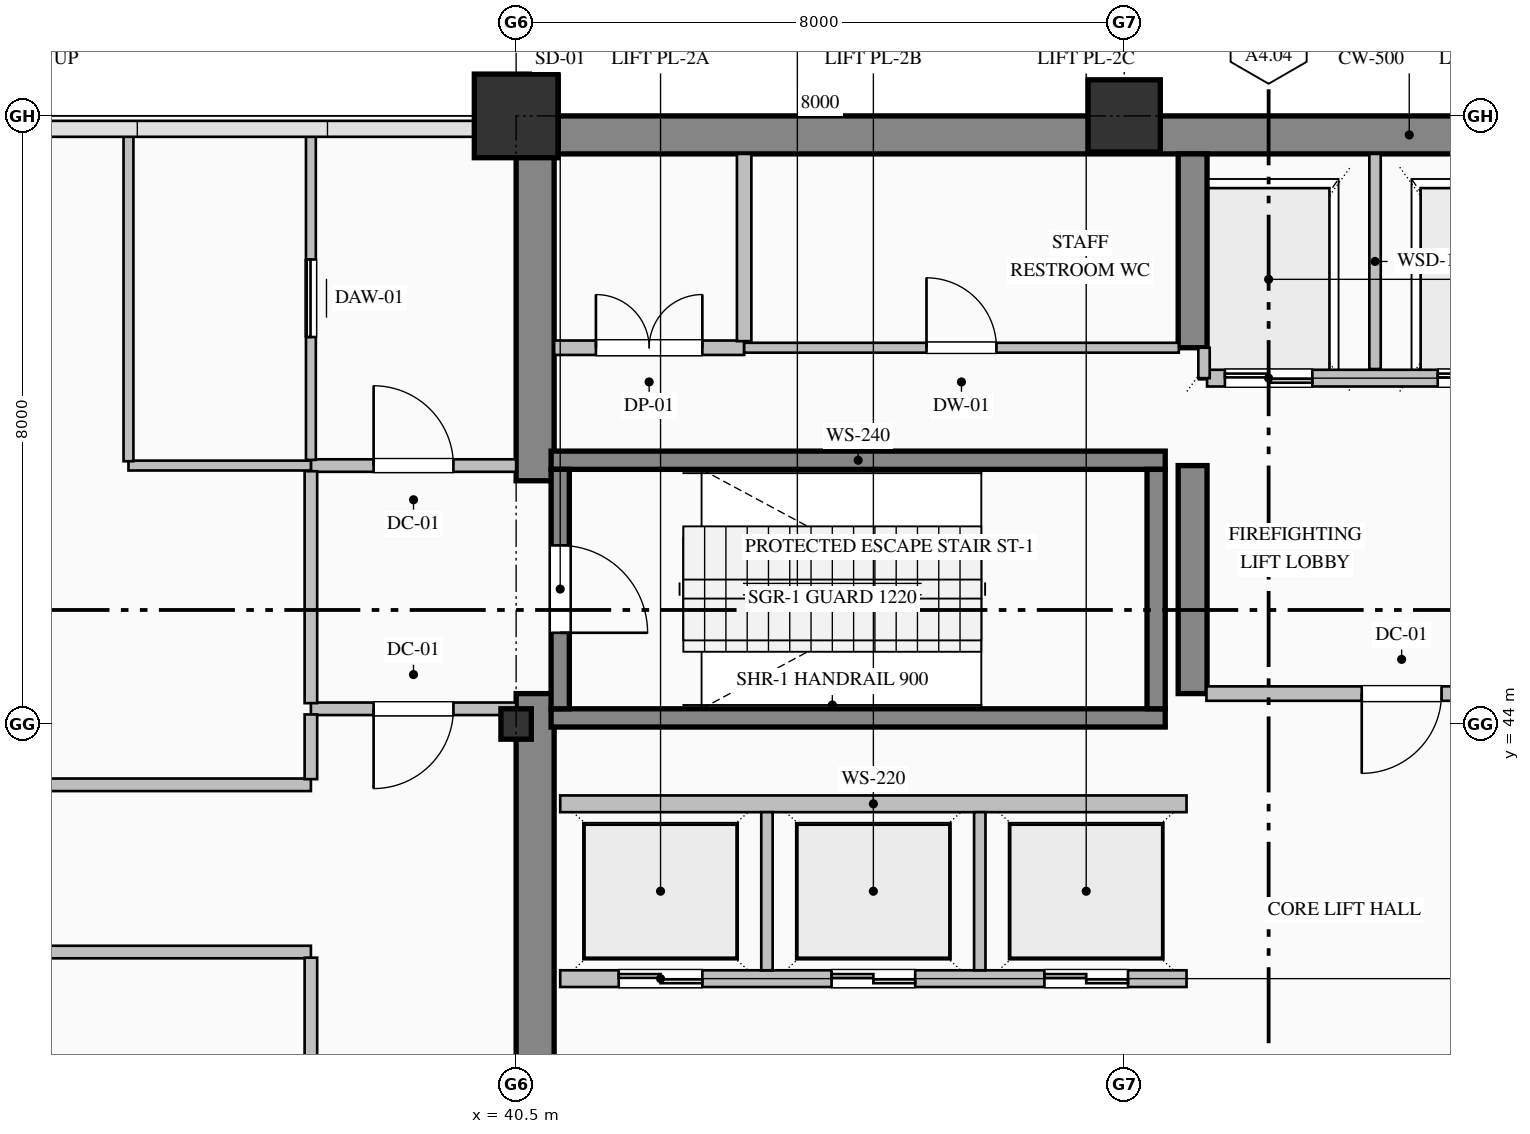
"""IFC4 building model, lengths in metres.
Left out: names, types, materials, properties, quantities, classifications, styles, units other than length and angle.
Written with IfcOpenShell. Run it as: python <this file> out.ifc"""

import sys

from ifc_helpers import new_model, si_unit, direction, frame, frame_2d, origin, origin_2d, place, context, subcontext, project, spatial, rectangle, hollow_rectangle, i_section, extrude, element, fill, save


model = new_model("IFC4")
c1 = context("Model", 3, precision=1e-05, world=origin(), true_north=direction((0.0, 1.0)))
c2 = subcontext(c1, "Body", "Model", "MODEL_VIEW")
j1 = project(units=[si_unit("LENGTHUNIT", "METRE"), si_unit("PLANEANGLEUNIT", "RADIAN")], contexts=[c1])
p1 = place(None, origin())
s1 = spatial("IfcSite", under=j1, at=p1, CompositionType="ELEMENT")
p2 = place(p1, origin())
s2 = spatial("IfcBuilding", under=s1, at=p2, CompositionType="ELEMENT")
p3 = place(p2, frame((0.0, 0.0, 113.6)))
s3 = spatial("IfcBuildingStorey", under=s2, at=p3, CompositionType="ELEMENT", Elevation=113.6)
p4 = place(p3, frame((40.5, 51.75, 0.0), z_axis=(0.0, 0.0, 1.0), x_axis=(1.0, 0.0, 0.0)))
e1 = element("IfcWall", 1, at=p4, inside=s3, PredefinedType="SHEAR", context=c2, shape_type="SweptSolid", body=[
    extrude(rectangle(XDim=23.5, YDim=0.5, at=frame_2d((11.75, 0.0))), origin(), (0.0, 0.0, 1.0), 5.165),
])
p5 = place(p3, frame((40.75, 36.5, 0.0), z_axis=(0.0, 0.0, 1.0), x_axis=(0.0, 1.0, 0.0)))
e2 = element("IfcWall", 2, at=p5, inside=s3, PredefinedType="SHEAR", context=c2, shape_type="SweptSolid", body=[
    extrude(rectangle(XDim=7.9, YDim=0.5, at=frame_2d((3.95, 0.0))), origin(), (0.0, 0.0, 1.0), 5.165),
])
p6 = place(p3, frame((40.75, 47.2, 0.0), z_axis=(0.0, 0.0, 1.0), x_axis=(0.0, 1.0, 0.0)))
e3 = element("IfcWall", 3, at=p6, inside=s3, PredefinedType="SHEAR", context=c2, shape_type="SweptSolid", body=[
    extrude(rectangle(XDim=4.3, YDim=0.5, at=frame_2d((2.15, 0.0))), origin(), (0.0, 0.0, 1.0), 5.165),
])
p7 = place(p3, frame((49.4, 44.4, 0.0), z_axis=(0.0, 0.0, 1.0), x_axis=(0.0, 1.0, 0.0)))
e4 = element("IfcWall", 4, at=p7, inside=s3, PredefinedType="SHEAR", context=c2, shape_type="SweptSolid", body=[
    extrude(rectangle(XDim=3.0, YDim=0.38, at=frame_2d((1.5, 0.0))), origin(), (0.0, 0.0, 1.0), 5.165),
])
p8 = place(p3, frame((49.4, 48.95, 0.0), z_axis=(0.0, 0.0, 1.0), x_axis=(0.0, 1.0, 0.0)))
e5 = element("IfcWall", 5, at=p8, inside=s3, PredefinedType="SHEAR", context=c2, shape_type="SweptSolid", body=[
    extrude(rectangle(XDim=2.55, YDim=0.38, at=frame_2d((1.275, 0.0))), origin(), (0.0, 0.0, 1.0), 5.165),
])
p9 = place(p3, frame((40.5, 44.0, 0.0), z_axis=(0.0, 0.0, 1.0), x_axis=(1.0, 0.0, 0.0)))
e6 = element("IfcColumn", 6, at=p9, inside=s3, PredefinedType="COLUMN", context=c2, shape_type="SweptSolid", body=[
    extrude(i_section(OverallWidth=0.4, OverallDepth=0.4, WebThickness=0.013, FlangeThickness=0.021, FilletRadius=0.022, at=origin_2d()), origin(), (0.0, 0.0, 1.0), 5.4),
])
p10 = place(p3, frame((40.5, 52.0, 0.0), z_axis=(0.0, 0.0, 1.0), x_axis=(1.0, 0.0, 0.0)))
e7 = element("IfcColumn", 7, at=p10, inside=s3, PredefinedType="COLUMN", context=c2, shape_type="SweptSolid", body=[
    extrude(hollow_rectangle(XDim=1.1, YDim=1.1, WallThickness=0.04, at=origin_2d()), origin(), (0.0, 0.0, 1.0), 5.4),
])
p11 = place(p3, frame((48.5, 52.0, 0.0), z_axis=(0.0, 0.0, 1.0), x_axis=(1.0, 0.0, 0.0)))
e8 = element("IfcColumn", 8, at=p11, inside=s3, PredefinedType="COLUMN", context=c2, shape_type="SweptSolid", body=[
    extrude(hollow_rectangle(XDim=0.95, YDim=0.95, WallThickness=0.036, at=origin_2d()), origin(), (0.0, 0.0, 1.0), 5.4),
])
for number, where, z_axis, x_axis in (
    (9, (40.96, 47.47, 0.0), (0.0, 0.0, 1.0), (1.0, 0.0, 0.0)),
    (10, (49.04, 44.08, 0.0), (0.0, 0.0, 1.0), (-1.0, 0.0, 0.0)),
):
    element("IfcWall", number, at=place(p3, frame(where, z_axis=z_axis, x_axis=x_axis)), inside=s3, PredefinedType="SOLIDWALL", context=c2, shape_type="SweptSolid", body=[
        extrude(rectangle(XDim=8.08, YDim=0.24, at=frame_2d((4.04, 0.0))), origin(), (0.0, 0.0, 1.0), 5.4),
    ])
p12 = place(p3, frame((41.08, 47.35, 0.0), z_axis=(0.0, 0.0, 1.0), x_axis=(0.0, -1.0, 0.0)))
e11 = element("IfcWall", 11, at=p12, inside=s3, PredefinedType="SOLIDWALL", context=c2, shape_type="SweptSolid", body=[
    extrude(rectangle(XDim=3.15, YDim=0.24, at=frame_2d((1.575, 0.0))), origin(), (0.0, 0.0, 1.0), 5.4),
])
p13 = place(p12, frame((1.0, 0.0, 0.0)))
e12 = element("IfcOpeningElement", 12, at=p13, cuts=e11, PredefinedType="OPENING", context=c2, shape_type="SweptSolid", body=[
    extrude(rectangle(XDim=1.15, YDim=2.2, at=frame_2d((0.575, 1.1))), frame((0.0, 0.13, 0.0), z_axis=(0.0, -1.0, 0.0), x_axis=(1.0, 0.0, 0.0)), (0.0, 0.0, 1.0), 0.26),
])
p14 = place(p3, frame((48.92, 44.2, 0.0), z_axis=(0.0, 0.0, 1.0), x_axis=(0.0, 1.0, 0.0)))
e13 = element("IfcWall", 13, at=p14, inside=s3, PredefinedType="SOLIDWALL", context=c2, shape_type="SweptSolid", body=[
    extrude(rectangle(XDim=3.15, YDim=0.24, at=frame_2d((1.575, 0.0))), origin(), (0.0, 0.0, 1.0), 5.4),
])
p15 = place(p3, frame((54.71, 48.55, 0.0), z_axis=(0.0, 0.0, 1.0), x_axis=(-1.0, 0.0, 0.0)))
e14 = element("IfcWall", 14, at=p15, inside=s3, PredefinedType="PARTITIONING", context=c2, shape_type="SweptSolid", body=[
    extrude(rectangle(XDim=5.12, YDim=0.22, at=frame_2d((2.56, 0.0))), origin(), (0.0, 0.0, 1.0), 5.165),
])
p16 = place(p15, frame((3.735, 0.0, 0.0)))
e15 = element("IfcOpeningElement", 15, at=p16, cuts=e14, PredefinedType="OPENING", context=c2, shape_type="SweptSolid", body=[
    extrude(rectangle(XDim=1.15, YDim=2.2, at=frame_2d((0.575, 1.1))), frame((0.0, 0.12, 0.0), z_axis=(0.0, -1.0, 0.0), x_axis=(1.0, 0.0, 0.0)), (0.0, 0.0, 1.0), 0.24),
])
p17 = place(p15, frame((0.935, 0.0, 0.0)))
e16 = element("IfcOpeningElement", 16, at=p17, cuts=e14, PredefinedType="OPENING", context=c2, shape_type="SweptSolid", body=[
    extrude(rectangle(XDim=1.15, YDim=2.2, at=frame_2d((0.575, 1.1))), frame((0.0, 0.12, 0.0), z_axis=(0.0, -1.0, 0.0), x_axis=(1.0, 0.0, 0.0)), (0.0, 0.0, 1.0), 0.24),
])
p18 = place(p3, frame((51.8, 48.67, 0.0), z_axis=(0.0, 0.0, 1.0), x_axis=(0.0, 1.0, 0.0)))
e17 = element("IfcWall", 17, at=p18, inside=s3, PredefinedType="PARTITIONING", context=c2, shape_type="SweptSolid", body=[
    extrude(rectangle(XDim=2.83, YDim=0.15, at=frame_2d((1.415, 0.0))), origin(), (0.0, 0.0, 1.0), 5.165),
])
p19 = place(p3, frame((49.55, 48.55, 0.0), z_axis=(0.0, 0.0, 1.0), x_axis=(0.0, 1.0, 0.0)))
e18 = element("IfcWall", 18, at=p19, inside=s3, PredefinedType="PARTITIONING", context=c2, shape_type="SweptSolid", body=[
    extrude(rectangle(XDim=0.4, YDim=0.15, at=frame_2d((0.2, 0.0))), origin(), (0.0, 0.0, 1.0), 5.165),
])
p20 = place(p3, frame((49.32, 40.65, 0.0), z_axis=(0.0, 0.0, 1.0), x_axis=(-1.0, 0.0, 0.0)))
e19 = element("IfcWall", 19, at=p20, inside=s3, PredefinedType="PARTITIONING", context=c2, shape_type="SweptSolid", body=[
    extrude(rectangle(XDim=8.24, YDim=0.22, at=frame_2d((4.12, 0.0))), origin(), (0.0, 0.0, 1.0), 5.165),
])
p21 = place(p20, frame((6.37, 0.0, 0.0)))
e20 = element("IfcOpeningElement", 20, at=p21, cuts=e19, PredefinedType="OPENING", context=c2, shape_type="SweptSolid", body=[
    extrude(rectangle(XDim=1.1, YDim=2.2, at=frame_2d((0.55, 1.1))), frame((0.0, 0.12, 0.0), z_axis=(0.0, -1.0, 0.0), x_axis=(1.0, 0.0, 0.0)), (0.0, 0.0, 1.0), 0.24),
])
p22 = place(p20, frame((3.57, 0.0, 0.0)))
e21 = element("IfcOpeningElement", 21, at=p22, cuts=e19, PredefinedType="OPENING", context=c2, shape_type="SweptSolid", body=[
    extrude(rectangle(XDim=1.1, YDim=2.2, at=frame_2d((0.55, 1.1))), frame((0.0, 0.12, 0.0), z_axis=(0.0, -1.0, 0.0), x_axis=(1.0, 0.0, 0.0)), (0.0, 0.0, 1.0), 0.24),
])
p23 = place(p20, frame((0.77, 0.0, 0.0)))
e22 = element("IfcOpeningElement", 22, at=p23, cuts=e19, PredefinedType="OPENING", context=c2, shape_type="SweptSolid", body=[
    extrude(rectangle(XDim=1.1, YDim=2.2, at=frame_2d((0.55, 1.1))), frame((0.0, 0.12, 0.0), z_axis=(0.0, -1.0, 0.0), x_axis=(1.0, 0.0, 0.0)), (0.0, 0.0, 1.0), 0.24),
])
p24 = place(p3, frame((41.08, 42.95, 0.0), z_axis=(0.0, 0.0, 1.0), x_axis=(1.0, 0.0, 0.0)))
e23 = element("IfcWall", 23, at=p24, inside=s3, PredefinedType="PARTITIONING", context=c2, shape_type="SweptSolid", body=[
    extrude(rectangle(XDim=8.24, YDim=0.22, at=frame_2d((4.12, 0.0))), origin(), (0.0, 0.0, 1.0), 5.165),
])
for number, where, z_axis, x_axis in (
    (24, (43.8, 40.76, 0.0), (0.0, 0.0, 1.0), (0.0, 1.0, 0.0)),
    (25, (46.6, 40.76, 0.0), (0.0, 0.0, 1.0), (0.0, 1.0, 0.0)),
):
    element("IfcWall", number, at=place(p3, frame(where, z_axis=z_axis, x_axis=x_axis)), inside=s3, PredefinedType="PARTITIONING", context=c2, shape_type="SweptSolid", body=[
        extrude(rectangle(XDim=2.08, YDim=0.15, at=frame_2d((1.04, 0.0))), origin(), (0.0, 0.0, 1.0), 5.165),
    ])
p25 = place(p3, frame((37.8, 47.4, 0.0), z_axis=(0.0, 0.0, 1.0), x_axis=(1.0, 0.0, 0.0)))
e26 = element("IfcWall", 26, at=p25, inside=s3, PredefinedType="PARTITIONING", context=c2, shape_type="SweptSolid", body=[
    extrude(rectangle(XDim=2.7, YDim=0.165, at=frame_2d((1.35, 0.0))), origin(), (0.0, 0.0, 1.0), 5.165),
])
p26 = place(p25, frame((0.825, 0.0, 0.0)))
e27 = element("IfcOpeningElement", 27, at=p26, cuts=e26, PredefinedType="OPENING", context=c2, shape_type="SweptSolid", body=[
    extrude(rectangle(XDim=1.05, YDim=2.15, at=frame_2d((0.525, 1.075))), frame((0.0, 0.093, 0.0), z_axis=(0.0, -1.0, 0.0), x_axis=(1.0, 0.0, 0.0)), (0.0, 0.0, 1.0), 0.185),
])
p27 = place(p3, frame((40.5, 44.2, 0.0), z_axis=(0.0, 0.0, 1.0), x_axis=(-1.0, 0.0, 0.0)))
e28 = element("IfcWall", 28, at=p27, inside=s3, PredefinedType="PARTITIONING", context=c2, shape_type="SweptSolid", body=[
    extrude(rectangle(XDim=2.7, YDim=0.165, at=frame_2d((1.35, 0.0))), origin(), (0.0, 0.0, 1.0), 5.165),
])
p28 = place(p27, frame((0.825, 0.0, 0.0)))
e29 = element("IfcOpeningElement", 29, at=p28, cuts=e28, PredefinedType="OPENING", context=c2, shape_type="SweptSolid", body=[
    extrude(rectangle(XDim=1.05, YDim=2.15, at=frame_2d((0.525, 1.075))), frame((0.0, 0.093, 0.0), z_axis=(0.0, -1.0, 0.0), x_axis=(1.0, 0.0, 0.0)), (0.0, 0.0, 1.0), 0.185),
])
p29 = place(p3, frame((37.8, 44.274, 0.0), z_axis=(0.0, 0.0, 1.0), x_axis=(0.0, 1.0, 0.0)))
e30 = element("IfcWall", 30, at=p29, inside=s3, PredefinedType="PARTITIONING", context=c2, shape_type="SweptSolid", body=[
    extrude(rectangle(XDim=3.051, YDim=0.165, at=frame_2d((1.525, 0.0))), origin(), (0.0, 0.0, 1.0), 5.165),
])
p30 = place(p3, frame((37.8, 47.475, 0.0), z_axis=(0.0, 0.0, 1.0), x_axis=(0.0, 1.0, 0.0)))
e31 = element("IfcWall", 31, at=p30, inside=s3, PredefinedType="PARTITIONING", context=c2, shape_type="SweptSolid", body=[
    extrude(rectangle(XDim=4.253, YDim=0.13, at=frame_2d((2.127, 0.0))), origin(), (0.0, 0.0, 1.0), 5.165),
])
p31 = place(p30, frame((1.617, 0.0, 0.0)))
e32 = element("IfcOpeningElement", 32, at=p31, cuts=e31, PredefinedType="OPENING", context=c2, shape_type="SweptSolid", body=[
    extrude(rectangle(XDim=1.02, YDim=2.15, at=frame_2d((0.51, 1.075))), frame((0.0, 0.075, 0.0), z_axis=(0.0, -1.0, 0.0), x_axis=(1.0, 0.0, 0.0)), (0.0, 0.0, 1.0), 0.15),
])
p32 = place(p3, frame((37.8, 47.4, 0.0), z_axis=(0.0, 0.0, 1.0), x_axis=(-1.0, 0.0, 0.0)))
e33 = element("IfcWall", 33, at=p32, inside=s3, PredefinedType="PARTITIONING", context=c2, shape_type="SweptSolid", body=[
    extrude(rectangle(XDim=2.4, YDim=0.13, at=frame_2d((1.2, 0.0))), origin(), (0.0, 0.0, 1.0), 5.165),
])
p33 = place(p3, frame((35.4, 47.457, 0.0), z_axis=(0.0, 0.0, 1.0), x_axis=(0.0, 1.0, 0.0)))
e34 = element("IfcWall", 34, at=p33, inside=s3, PredefinedType="PARTITIONING", context=c2, shape_type="SweptSolid", body=[
    extrude(rectangle(XDim=4.271, YDim=0.13, at=frame_2d((2.135, 0.0))), origin(), (0.0, 0.0, 1.0), 5.165),
])
p34 = place(p3, frame((41.0, 48.95, 0.0), z_axis=(0.0, 0.0, 1.0), x_axis=(1.0, 0.0, 0.0)))
e35 = element("IfcWall", 35, at=p34, inside=s3, PredefinedType="PARTITIONING", context=c2, shape_type="SweptSolid", body=[
    extrude(rectangle(XDim=2.5, YDim=0.19, at=frame_2d((1.25, 0.0))), origin(), (0.0, 0.0, 1.0), 5.165),
])
p35 = place(p34, frame((0.55, 0.0, 0.0)))
e36 = element("IfcOpeningElement", 36, at=p35, cuts=e35, PredefinedType="OPENING", context=c2, shape_type="SweptSolid", body=[
    extrude(rectangle(XDim=1.4, YDim=2.25, at=frame_2d((0.7, 1.125))), frame((0.0, 0.105, 0.0), z_axis=(0.0, -1.0, 0.0), x_axis=(1.0, 0.0, 0.0)), (0.0, 0.0, 1.0), 0.21),
])
p36 = place(p3, frame((43.5, 48.95, 0.0), z_axis=(0.0, 0.0, 1.0), x_axis=(1.0, 0.0, 0.0)))
e37 = element("IfcWall", 37, at=p36, inside=s3, PredefinedType="PARTITIONING", context=c2, shape_type="SweptSolid", body=[
    extrude(rectangle(XDim=5.718, YDim=0.13, at=frame_2d((2.859, 0.0))), origin(), (0.0, 0.0, 1.0), 5.165),
])
p37 = place(p36, frame((2.399, 0.0, 0.0)))
e38 = element("IfcOpeningElement", 38, at=p37, cuts=e37, PredefinedType="OPENING", context=c2, shape_type="SweptSolid", body=[
    extrude(rectangle(XDim=0.92, YDim=2.15, at=frame_2d((0.46, 1.075))), frame((0.0, 0.075, 0.0), z_axis=(0.0, -1.0, 0.0), x_axis=(1.0, 0.0, 0.0)), (0.0, 0.0, 1.0), 0.15),
])
p38 = place(p3, frame((54.718, 44.4, 0.0), z_axis=(0.0, 0.0, 1.0), x_axis=(-1.0, 0.0, 0.0)))
e39 = element("IfcWall", 39, at=p38, inside=s3, PredefinedType="PARTITIONING", context=c2, shape_type="SweptSolid", body=[
    extrude(rectangle(XDim=5.136, YDim=0.19, at=frame_2d((2.568, 0.0))), origin(), (0.0, 0.0, 1.0), 5.165),
])
p39 = place(p38, frame((2.043, 0.0, 0.0)))
e40 = element("IfcOpeningElement", 40, at=p39, cuts=e39, PredefinedType="OPENING", context=c2, shape_type="SweptSolid", body=[
    extrude(rectangle(XDim=1.05, YDim=2.15, at=frame_2d((0.525, 1.075))), frame((0.0, 0.105, 0.0), z_axis=(0.0, -1.0, 0.0), x_axis=(1.0, 0.0, 0.0)), (0.0, 0.0, 1.0), 0.21),
])
p40 = place(p3, frame((43.5, 51.5, 0.0), z_axis=(0.0, 0.0, 1.0), x_axis=(0.0, -1.0, 0.0)))
e41 = element("IfcWall", 41, at=p40, inside=s3, PredefinedType="PARTITIONING", context=c2, shape_type="SweptSolid", body=[
    extrude(rectangle(XDim=2.463, YDim=0.19, at=frame_2d((1.231, 0.0))), origin(), (0.0, 0.0, 1.0), 5.165),
])
p41 = place(p3, frame((16.5, 43.2, 0.0), z_axis=(0.0, 0.0, 1.0), x_axis=(1.0, 0.0, 0.0)))
e42 = element("IfcWall", 42, at=p41, inside=s3, PredefinedType="PARTITIONING", context=c2, shape_type="SweptSolid", body=[
    extrude(rectangle(XDim=21.3, YDim=0.165, at=frame_2d((10.65, 0.0))), origin(), (0.0, 0.0, 1.0), 5.165),
])
p42 = place(p41, frame((10.15, 0.0, 0.0)))
e43 = element("IfcOpeningElement", 43, at=p42, cuts=e42, PredefinedType="OPENING", context=c2, shape_type="SweptSolid", body=[
    extrude(rectangle(XDim=1.0, YDim=2.15, at=frame_2d((0.5, 1.075))), frame((0.0, 0.093, 0.0), z_axis=(0.0, -1.0, 0.0), x_axis=(1.0, 0.0, 0.0)), (0.0, 0.0, 1.0), 0.185),
])
p43 = place(p3, frame((37.8, 41.0, 0.0), z_axis=(0.0, 0.0, 1.0), x_axis=(-1.0, 0.0, 0.0)))
e44 = element("IfcWall", 44, at=p43, inside=s3, PredefinedType="PARTITIONING", context=c2, shape_type="SweptSolid", body=[
    extrude(rectangle(XDim=9.6, YDim=0.165, at=frame_2d((4.8, 0.0))), origin(), (0.0, 0.0, 1.0), 5.165),
])
p44 = place(p3, frame((37.8, 43.274, 0.0), z_axis=(0.0, 0.0, 1.0), x_axis=(0.0, 1.0, 0.0)))
e45 = element("IfcWall", 45, at=p44, inside=s3, PredefinedType="PARTITIONING", context=c2, shape_type="SweptSolid", body=[
    extrude(rectangle(XDim=0.851, YDim=0.165, at=frame_2d((0.426, 0.0))), origin(), (0.0, 0.0, 1.0), 5.165),
])
p45 = place(p3, frame((37.8, 33.475, 0.0), z_axis=(0.0, 0.0, 1.0), x_axis=(0.0, 1.0, 0.0)))
e46 = element("IfcWall", 46, at=p45, inside=s3, PredefinedType="PARTITIONING", context=c2, shape_type="SweptSolid", body=[
    extrude(rectangle(XDim=7.451, YDim=0.165, at=frame_2d((3.726, 0.0))), origin(), (0.0, 0.0, 1.0), 5.165),
])
p46 = place(p13, origin())
e47 = element("IfcDoor", 47, at=p46, inside=s3, OperationType="SINGLE_SWING_RIGHT", PredefinedType="DOOR", context=c2, shape_type="SweptSolid", body=[
    extrude(rectangle(XDim=1.15, YDim=2.2, at=frame_2d((0.575, 1.1))), frame((0.0, 0.025, 0.0), z_axis=(0.0, -1.0, 0.0), x_axis=(1.0, 0.0, 0.0)), (0.0, 0.0, 1.0), 0.05),
])
fill(e12, e47)
p47 = place(p16, origin())
e48 = element("IfcDoor", 48, at=p47, inside=s3, OperationType="DOUBLE_DOOR_SLIDING", PredefinedType="DOOR", context=c2, shape_type="SweptSolid", body=[
    extrude(rectangle(XDim=1.15, YDim=2.2, at=frame_2d((0.575, 1.1))), frame((0.0, 0.025, 0.0), z_axis=(0.0, -1.0, 0.0), x_axis=(1.0, 0.0, 0.0)), (0.0, 0.0, 1.0), 0.05),
])
fill(e15, e48)
p48 = place(p17, origin())
e49 = element("IfcDoor", 49, at=p48, inside=s3, OperationType="DOUBLE_DOOR_SLIDING", PredefinedType="DOOR", context=c2, shape_type="SweptSolid", body=[
    extrude(rectangle(XDim=1.15, YDim=2.2, at=frame_2d((0.575, 1.1))), frame((0.0, 0.025, 0.0), z_axis=(0.0, -1.0, 0.0), x_axis=(1.0, 0.0, 0.0)), (0.0, 0.0, 1.0), 0.05),
])
fill(e16, e49)
p49 = place(p21, origin())
e50 = element("IfcDoor", 50, at=p49, inside=s3, OperationType="DOUBLE_DOOR_SLIDING", PredefinedType="DOOR", context=c2, shape_type="SweptSolid", body=[
    extrude(rectangle(XDim=1.1, YDim=2.2, at=frame_2d((0.55, 1.1))), frame((0.0, 0.025, 0.0), z_axis=(0.0, -1.0, 0.0), x_axis=(1.0, 0.0, 0.0)), (0.0, 0.0, 1.0), 0.05),
])
fill(e20, e50)
p50 = place(p22, origin())
e51 = element("IfcDoor", 51, at=p50, inside=s3, OperationType="DOUBLE_DOOR_SLIDING", PredefinedType="DOOR", context=c2, shape_type="SweptSolid", body=[
    extrude(rectangle(XDim=1.1, YDim=2.2, at=frame_2d((0.55, 1.1))), frame((0.0, 0.025, 0.0), z_axis=(0.0, -1.0, 0.0), x_axis=(1.0, 0.0, 0.0)), (0.0, 0.0, 1.0), 0.05),
])
fill(e21, e51)
p51 = place(p23, origin())
e52 = element("IfcDoor", 52, at=p51, inside=s3, OperationType="DOUBLE_DOOR_SLIDING", PredefinedType="DOOR", context=c2, shape_type="SweptSolid", body=[
    extrude(rectangle(XDim=1.1, YDim=2.2, at=frame_2d((0.55, 1.1))), frame((0.0, 0.025, 0.0), z_axis=(0.0, -1.0, 0.0), x_axis=(1.0, 0.0, 0.0)), (0.0, 0.0, 1.0), 0.05),
])
fill(e22, e52)
p52 = place(p39, origin())
e53 = element("IfcDoor", 53, at=p52, inside=s3, OperationType="SINGLE_SWING_RIGHT", PredefinedType="DOOR", context=c2, shape_type="SweptSolid", body=[
    extrude(rectangle(XDim=1.05, YDim=2.15, at=frame_2d((0.525, 1.075))), frame((0.0, 0.025, 0.0), z_axis=(0.0, -1.0, 0.0), x_axis=(1.0, 0.0, 0.0)), (0.0, 0.0, 1.0), 0.05),
])
fill(e40, e53)
p53 = place(p26, origin())
e54 = element("IfcDoor", 54, at=p53, inside=s3, OperationType="SINGLE_SWING_LEFT", PredefinedType="DOOR", context=c2, shape_type="SweptSolid", body=[
    extrude(rectangle(XDim=1.05, YDim=2.15, at=frame_2d((0.525, 1.075))), frame((0.0, 0.025, 0.0), z_axis=(0.0, -1.0, 0.0), x_axis=(1.0, 0.0, 0.0)), (0.0, 0.0, 1.0), 0.05),
])
fill(e27, e54)
p54 = place(p28, origin())
e55 = element("IfcDoor", 55, at=p54, inside=s3, OperationType="SINGLE_SWING_RIGHT", PredefinedType="DOOR", context=c2, shape_type="SweptSolid", body=[
    extrude(rectangle(XDim=1.05, YDim=2.15, at=frame_2d((0.525, 1.075))), frame((0.0, 0.025, 0.0), z_axis=(0.0, -1.0, 0.0), x_axis=(1.0, 0.0, 0.0)), (0.0, 0.0, 1.0), 0.05),
])
fill(e29, e55)
p55 = place(p31, origin())
e56 = element("IfcDoor", 56, at=p55, inside=s3, OperationType="SLIDING_TO_LEFT", PredefinedType="DOOR", context=c2, shape_type="SweptSolid", body=[
    extrude(rectangle(XDim=1.02, YDim=2.15, at=frame_2d((0.51, 1.075))), frame((0.0, 0.025, 0.0), z_axis=(0.0, -1.0, 0.0), x_axis=(1.0, 0.0, 0.0)), (0.0, 0.0, 1.0), 0.05),
])
fill(e32, e56)
p56 = place(p35, origin())
e57 = element("IfcDoor", 57, at=p56, inside=s3, OperationType="DOUBLE_DOOR_SINGLE_SWING", PredefinedType="DOOR", context=c2, shape_type="SweptSolid", body=[
    extrude(rectangle(XDim=1.4, YDim=2.25, at=frame_2d((0.7, 1.125))), frame((0.0, 0.025, 0.0), z_axis=(0.0, -1.0, 0.0), x_axis=(1.0, 0.0, 0.0)), (0.0, 0.0, 1.0), 0.05),
])
fill(e36, e57)
p57 = place(p37, origin())
e58 = element("IfcDoor", 58, at=p57, inside=s3, OperationType="SINGLE_SWING_LEFT", PredefinedType="DOOR", context=c2, shape_type="SweptSolid", body=[
    extrude(rectangle(XDim=0.92, YDim=2.15, at=frame_2d((0.46, 1.075))), frame((0.0, 0.025, 0.0), z_axis=(0.0, -1.0, 0.0), x_axis=(1.0, 0.0, 0.0)), (0.0, 0.0, 1.0), 0.05),
])
fill(e38, e58)
save(model, sys.argv[1])
